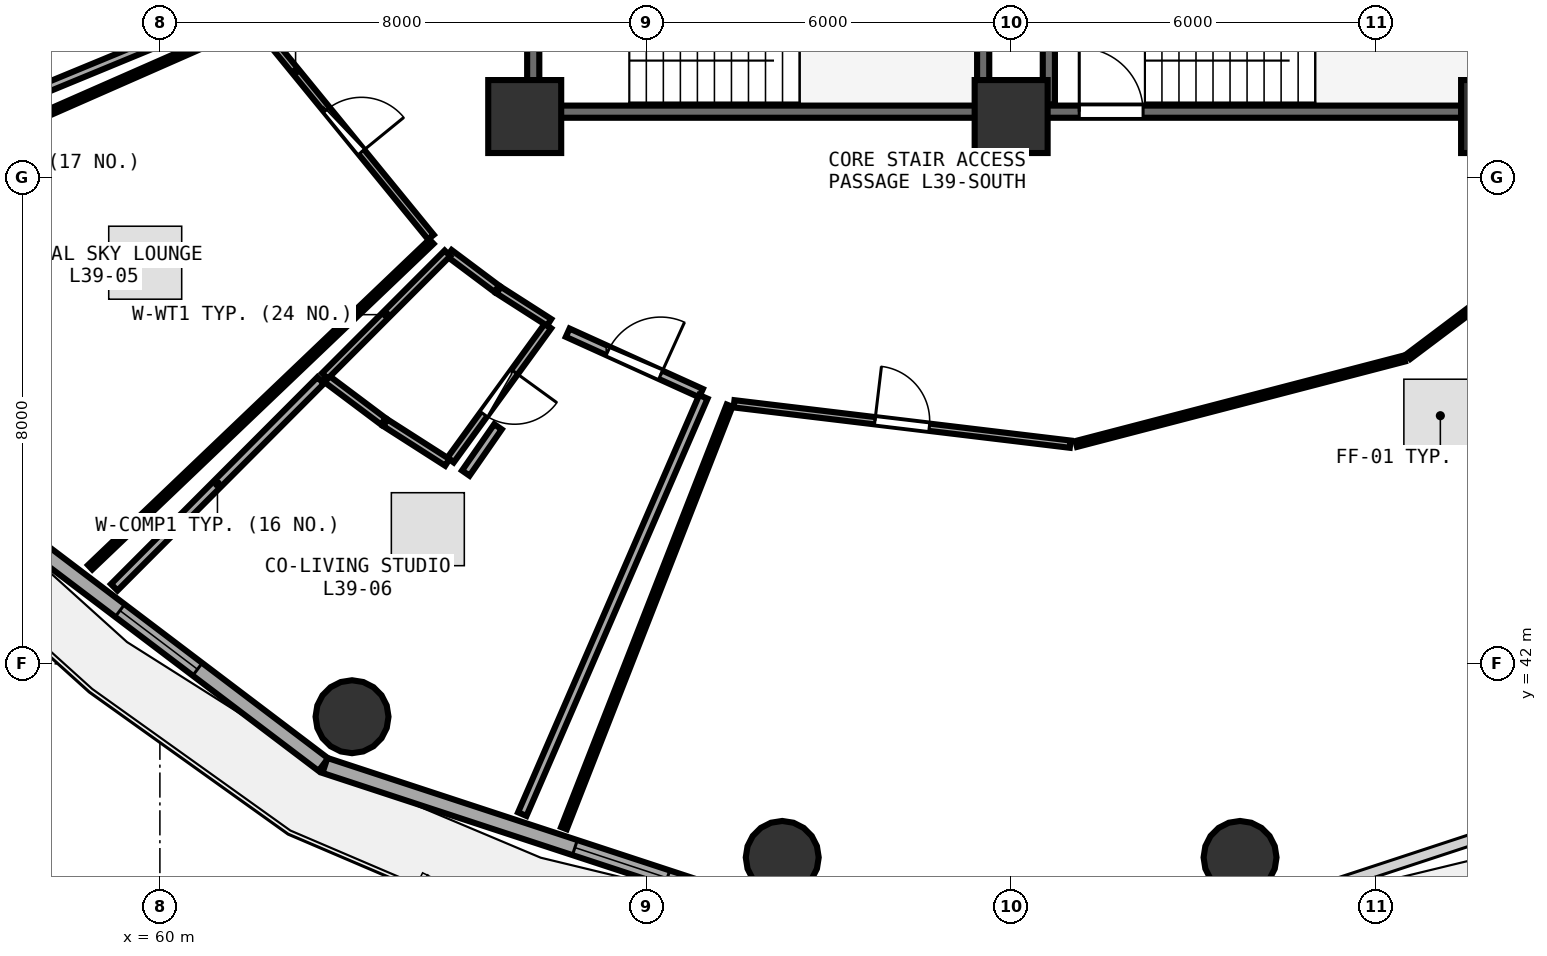
"""IFC4 building model, lengths in metres.
Left out: names, types, materials, properties, quantities, classifications, styles, units other than length and angle.
Written with IfcOpenShell. Run it as: python <this file> out.ifc"""

import sys

from ifc_helpers import new_model, si_unit, direction, frame, frame_2d, origin, origin_2d, place, context, subcontext, project, spatial, rectangle, circle, extrude, element, fill, save


model = new_model("IFC4")
c1 = context("Model", 3, precision=1e-05, world=origin(), true_north=direction((0.0, 1.0)))
c2 = subcontext(c1, "Body", "Model", "MODEL_VIEW")
j1 = project(units=[si_unit("LENGTHUNIT", "METRE"), si_unit("PLANEANGLEUNIT", "RADIAN")], contexts=[c1])
p1 = place(None, origin())
s1 = spatial("IfcSite", under=j1, at=p1, CompositionType="ELEMENT")
p2 = place(p1, origin())
s2 = spatial("IfcBuilding", under=s1, at=p2, CompositionType="ELEMENT")
p3 = place(p2, frame((0.0, 0.0, 154.35)))
s3 = spatial("IfcBuildingStorey", under=s2, at=p3, CompositionType="ELEMENT", Elevation=154.35)
for number, where, z_axis, x_axis in (
    (1, (66.0, 51.0, 0.0), (0.0, 0.0, 1.0), (1.0, 0.0, 0.0)),
    (2, (74.0, 51.0, 0.0), (0.0, 0.0, 1.0), (1.0, 0.0, 0.0)),
    (3, (82.0, 51.0, 0.0), (0.0, 0.0, 1.0), (1.0, 0.0, 0.0)),
):
    element("IfcColumn", number, at=place(p3, frame(where, z_axis=z_axis, x_axis=x_axis)), inside=s3, PredefinedType="PILASTER", context=c2, shape_type="SweptSolid", body=[
        extrude(rectangle(XDim=1.2, YDim=1.2, at=origin_2d()), origin(), (0.0, 0.0, 1.0), 3.75),
    ])
for number, where, z_axis, x_axis in (
    (4, (63.16, 41.13, 0.0), (0.0, 0.0, 1.0), (1.0, 0.0, 0.0)),
    (5, (70.235, 38.816, 0.0), (0.0, 0.0, 1.0), (1.0, 0.0, 0.0)),
    (6, (77.765, 38.816, 0.0), (0.0, 0.0, 1.0), (1.0, 0.0, 0.0)),
):
    element("IfcColumn", number, at=place(p3, frame(where, z_axis=z_axis, x_axis=x_axis)), inside=s3, PredefinedType="COLUMN", context=c2, shape_type="SweptSolid", body=[
        extrude(circle(Radius=0.6, at=origin_2d()), origin(), (0.0, 0.0, 1.0), 3.75),
    ])
p4 = place(p3, frame((56.699, 44.878, 0.0), z_axis=(0.0, 0.0, 1.0), x_axis=(0.797163719609, -0.603763202042, 0.0)))
e7 = element("IfcWall", 7, at=p4, inside=s3, PredefinedType="SOLIDWALL", context=c2, shape_type="SweptSolid", body=[
    extrude(rectangle(XDim=7.512, YDim=0.26, at=frame_2d((3.756, 0.0))), origin(), (0.0, 0.0, 1.0), 3.475),
])
p5 = place(p4, frame((3.316, 0.0, 0.85)))
e8 = element("IfcOpeningElement", 8, at=p5, cuts=e7, PredefinedType="OPENING", context=c2, shape_type="SweptSolid", body=[
    extrude(rectangle(XDim=1.6, YDim=1.45, at=frame_2d((0.8, 0.725))), frame((0.0, 0.14, 0.0), z_axis=(0.0, -1.0, 0.0), x_axis=(1.0, 0.0, 0.0)), (0.0, 0.0, 1.0), 0.28),
])
p6 = place(p3, frame((62.714, 40.328, 0.0), z_axis=(0.0, 0.0, 1.0), x_axis=(0.950038302428, -0.312133343173, 0.0)))
e9 = element("IfcWall", 9, at=p6, inside=s3, PredefinedType="SOLIDWALL", context=c2, shape_type="SweptSolid", body=[
    extrude(rectangle(XDim=7.733, YDim=0.26, at=frame_2d((3.867, 0.0))), origin(), (0.0, 0.0, 1.0), 3.475),
])
p7 = place(p6, frame((4.327, 0.0, 0.85)))
e10 = element("IfcOpeningElement", 10, at=p7, cuts=e9, PredefinedType="OPENING", context=c2, shape_type="SweptSolid", body=[
    extrude(rectangle(XDim=1.6, YDim=1.45, at=frame_2d((0.8, 0.725))), frame((0.0, 0.14, 0.0), z_axis=(0.0, -1.0, 0.0), x_axis=(1.0, 0.0, 0.0)), (0.0, 0.0, 1.0), 0.28),
])
p8 = place(p3, frame((74.0, 51.08, 0.0), z_axis=(0.0, 0.0, 1.0), x_axis=(1.0, 0.0, 0.0)))
e11 = element("IfcWall", 11, at=p8, inside=s3, PredefinedType="SHEAR", context=c2, shape_type="SweptSolid", body=[
    extrude(rectangle(XDim=7.9, YDim=0.2, at=frame_2d((3.95, 0.0))), origin(), (0.0, 0.0, 1.0), 3.49),
])
p9 = place(p8, frame((1.12, 0.0, 0.0)))
e12 = element("IfcOpeningElement", 12, at=p9, cuts=e11, PredefinedType="OPENING", context=c2, shape_type="SweptSolid", body=[
    extrude(rectangle(XDim=1.05, YDim=2.1, at=frame_2d((0.525, 1.05))), frame((0.0, 0.11, 0.0), z_axis=(0.0, -1.0, 0.0), x_axis=(1.0, 0.0, 0.0)), (0.0, 0.0, 1.0), 0.22),
])
p10 = place(p3, frame((74.62, 54.27, 0.0), z_axis=(0.0, 0.0, 1.0), x_axis=(0.0, -1.0, 0.0)))
e13 = element("IfcWall", 13, at=p10, inside=s3, PredefinedType="SHEAR", context=c2, shape_type="SweptSolid", body=[
    extrude(rectangle(XDim=3.07, YDim=0.2, at=frame_2d((1.535, 0.0))), origin(), (0.0, 0.0, 1.0), 3.49),
])
p11 = place(p3, frame((66.26, 51.08, 0.0), z_axis=(0.0, 0.0, 1.0), x_axis=(1.0, 0.0, 0.0)))
e14 = element("IfcWall", 14, at=p11, inside=s3, PredefinedType="SHEAR", context=c2, shape_type="SweptSolid", body=[
    extrude(rectangle(XDim=7.16, YDim=0.2, at=frame_2d((3.58, 0.0))), origin(), (0.0, 0.0, 1.0), 3.49),
])
p12 = place(p3, frame((73.54, 51.2, 0.0), z_axis=(0.0, 0.0, 1.0), x_axis=(0.0, 1.0, 0.0)))
e15 = element("IfcWall", 15, at=p12, inside=s3, PredefinedType="SHEAR", context=c2, shape_type="SweptSolid", body=[
    extrude(rectangle(XDim=3.07, YDim=0.2, at=frame_2d((1.535, 0.0))), origin(), (0.0, 0.0, 1.0), 3.49),
])
p13 = place(p3, frame((66.14, 54.27, 0.0), z_axis=(0.0, 0.0, 1.0), x_axis=(0.0, -1.0, 0.0)))
e16 = element("IfcWall", 16, at=p13, inside=s3, PredefinedType="SHEAR", context=c2, shape_type="SweptSolid", body=[
    extrude(rectangle(XDim=3.07, YDim=0.2, at=frame_2d((1.535, 0.0))), origin(), (0.0, 0.0, 1.0), 3.49),
])
p14 = place(p13, frame((1.01, 0.0, 0.0)))
e17 = element("IfcOpeningElement", 17, at=p14, cuts=e16, PredefinedType="OPENING", context=c2, shape_type="SweptSolid", body=[
    extrude(rectangle(XDim=1.05, YDim=2.1, at=frame_2d((0.525, 1.05))), frame((0.0, 0.11, 0.0), z_axis=(0.0, -1.0, 0.0), x_axis=(1.0, 0.0, 0.0)), (0.0, 0.0, 1.0), 0.22),
])
p15 = place(p3, frame((69.443, 46.276, 0.0), z_axis=(0.0, 0.0, 1.0), x_axis=(0.992874348748, -0.119165966612, 0.0)))
e18 = element("IfcWall", 18, at=p15, inside=s3, PredefinedType="PARTITIONING", context=c2, shape_type="SweptSolid", body=[
    extrude(rectangle(XDim=5.569, YDim=0.12, at=frame_2d((2.784, 0.0))), origin(), (0.0, 0.0, 1.0), 2.975),
])
p16 = place(p15, frame((2.334, 0.0, 0.0)))
e19 = element("IfcOpeningElement", 19, at=p16, cuts=e18, PredefinedType="OPENING", context=c2, shape_type="SweptSolid", body=[
    extrude(rectangle(XDim=0.9, YDim=2.08, at=frame_2d((0.45, 1.04))), frame((0.0, 0.07, 0.0), z_axis=(0.0, -1.0, 0.0), x_axis=(1.0, 0.0, 0.0)), (0.0, 0.0, 1.0), 0.14),
])
p17 = place(p3, frame((61.604, 52.511, 0.0), z_axis=(0.0, 0.0, 1.0), x_axis=(0.632491819148, -0.77456703952, 0.0)))
e20 = element("IfcWall", 20, at=p17, inside=s3, PredefinedType="PARTITIONING", context=c2, shape_type="SweptSolid", body=[
    extrude(rectangle(XDim=4.511, YDim=0.12, at=frame_2d((2.255, 0.0))), origin(), (0.0, 0.0, 1.0), 2.975),
])
p18 = place(p17, frame((1.805, 0.0, 0.0)))
e21 = element("IfcOpeningElement", 21, at=p18, cuts=e20, PredefinedType="OPENING", context=c2, shape_type="SweptSolid", body=[
    extrude(rectangle(XDim=0.9, YDim=2.08, at=frame_2d((0.45, 1.04))), frame((0.0, 0.07, 0.0), z_axis=(0.0, -1.0, 0.0), x_axis=(1.0, 0.0, 0.0)), (0.0, 0.0, 1.0), 0.14),
])
p19 = place(p3, frame((66.383, 47.555, 0.0), z_axis=(0.0, 0.0, 1.0), x_axis=(-0.588001344837, -0.808859949849, 0.0)))
e22 = element("IfcWall", 22, at=p19, inside=s3, PredefinedType="PLUMBINGWALL", context=c2, shape_type="SweptSolid", body=[
    extrude(rectangle(XDim=2.727, YDim=0.13, at=frame_2d((1.364, 0.0))), origin(), (0.0, 0.0, 1.0), 3.235),
])
p20 = place(p19, frame((0.934, 0.0, 0.0)))
e23 = element("IfcOpeningElement", 23, at=p20, cuts=e22, PredefinedType="OPENING", context=c2, shape_type="SweptSolid", body=[
    extrude(rectangle(XDim=0.86, YDim=2.05, at=frame_2d((0.43, 1.025))), frame((0.0, 0.075, 0.0), z_axis=(0.0, -1.0, 0.0), x_axis=(1.0, 0.0, 0.0)), (0.0, 0.0, 1.0), 0.15),
])
p21 = place(p3, frame((66.707, 47.445, 0.0), z_axis=(0.0, 0.0, 1.0), x_axis=(0.910872904928, -0.412686989216, 0.0)))
e24 = element("IfcWall", 24, at=p21, inside=s3, PredefinedType="PARTITIONING", context=c2, shape_type="SweptSolid", body=[
    extrude(rectangle(XDim=2.407, YDim=0.15, at=frame_2d((1.204, 0.0))), origin(), (0.0, 0.0, 1.0), 3.235),
])
p22 = place(p21, frame((0.729, 0.0, 0.0)))
e25 = element("IfcOpeningElement", 25, at=p22, cuts=e24, PredefinedType="OPENING", context=c2, shape_type="SweptSolid", body=[
    extrude(rectangle(XDim=0.95, YDim=2.08, at=frame_2d((0.475, 1.04))), frame((0.0, 0.085, 0.0), z_axis=(0.0, -1.0, 0.0), x_axis=(1.0, 0.0, 0.0)), (0.0, 0.0, 1.0), 0.17),
])
p23 = place(p3, frame((75.07, 45.615, 0.0), z_axis=(0.0, 0.0, 1.0), x_axis=(0.967718115259, 0.252035016216, 0.0)))
e26 = element("IfcWall", 26, at=p23, inside=s3, PredefinedType="PARTITIONING", context=c2, shape_type="SweptSolid", body=[
    extrude(rectangle(XDim=5.575, YDim=0.1, at=frame_2d((2.787, 0.0))), origin(), (0.0, 0.0, 1.0), 2.975),
])
p24 = place(p3, frame((80.535, 47.054, 0.0), z_axis=(0.0, 0.0, 1.0), x_axis=(0.799096406603, 0.601202904979, 0.0)))
e27 = element("IfcWall", 27, at=p24, inside=s3, PredefinedType="PARTITIONING", context=c2, shape_type="SweptSolid", body=[
    extrude(rectangle(XDim=5.387, YDim=0.1, at=frame_2d((2.694, 0.0))), origin(), (0.0, 0.0, 1.0), 2.975),
])
p25 = place(p3, frame((66.645, 39.297, 0.0), z_axis=(0.0, 0.0, 1.0), x_axis=(0.364957999702, 0.931023983823, 0.0)))
e28 = element("IfcWall", 28, at=p25, inside=s3, PredefinedType="PARTITIONING", context=c2, shape_type="SweptSolid", body=[
    extrude(rectangle(XDim=7.464, YDim=0.1, at=frame_2d((3.732, 0.0))), origin(), (0.0, 0.0, 1.0), 3.025),
])
p26 = place(p3, frame((61.385, 52.817, 0.0), z_axis=(0.0, 0.0, 1.0), x_axis=(-0.924352507704, -0.381539567412, 0.0)))
e29 = element("IfcWall", 29, at=p26, inside=s3, PredefinedType="PARTITIONING", context=c2, shape_type="SweptSolid", body=[
    extrude(rectangle(XDim=8.037, YDim=0.15, at=frame_2d((4.019, 0.0))), origin(), (0.0, 0.0, 1.0), 2.975),
])
p27 = place(p3, frame((64.466, 48.943, 0.0), z_axis=(0.0, 0.0, 1.0), x_axis=(-0.723511266615, -0.690312572014, 0.0)))
e30 = element("IfcWall", 30, at=p27, inside=s3, PredefinedType="PARTITIONING", context=c2, shape_type="SweptSolid", body=[
    extrude(rectangle(XDim=7.758, YDim=0.1, at=frame_2d((3.879, 0.0))), origin(), (0.0, 0.0, 1.0), 3.025),
])
p28 = place(p3, frame((54.186, 49.312, 0.0), z_axis=(0.0, 0.0, 1.0), x_axis=(0.915373356269, 0.402606034024, 0.0)))
e31 = element("IfcWall", 31, at=p28, inside=s3, PredefinedType="PARTITIONING", context=c2, shape_type="SweptSolid", body=[
    extrude(rectangle(XDim=8.023, YDim=0.1, at=frame_2d((4.011, 0.0))), origin(), (0.0, 0.0, 1.0), 2.975),
])
p29 = place(p3, frame((64.759, 48.753, 0.0), z_axis=(0.0, 0.0, 1.0), x_axis=(0.800390142897, -0.599479456824, 0.0)))
e32 = element("IfcWall", 32, at=p29, inside=s3, PredefinedType="PLUMBINGWALL", context=c2, shape_type="SweptSolid", body=[
    extrude(rectangle(XDim=0.976, YDim=0.13, at=frame_2d((0.488, 0.0))), origin(), (0.0, 0.0, 1.0), 2.975),
])
p30 = place(p3, frame((65.573, 48.145, 0.0), z_axis=(0.0, 0.0, 1.0), x_axis=(0.842104586495, -0.539314254776, 0.0)))
e33 = element("IfcWall", 33, at=p30, inside=s3, PredefinedType="PLUMBINGWALL", context=c2, shape_type="SweptSolid", body=[
    extrude(rectangle(XDim=0.984, YDim=0.13, at=frame_2d((0.492, 0.0))), origin(), (0.0, 0.0, 1.0), 3.48),
])
p31 = place(p3, frame((64.727, 45.312, 0.0), z_axis=(0.0, 0.0, 1.0), x_axis=(-0.842330007588, 0.538962112135, 0.0)))
e34 = element("IfcWall", 34, at=p31, inside=s3, PredefinedType="PLUMBINGWALL", context=c2, shape_type="SweptSolid", body=[
    extrude(rectangle(XDim=1.21, YDim=0.13, at=frame_2d((0.605, 0.0))), origin(), (0.0, 0.0, 1.0), 2.975),
])
p32 = place(p3, frame((63.675, 45.987, 0.0), z_axis=(0.0, 0.0, 1.0), x_axis=(-0.8, 0.6, 0.0)))
e35 = element("IfcWall", 35, at=p32, inside=s3, PredefinedType="PLUMBINGWALL", context=c2, shape_type="SweptSolid", body=[
    extrude(rectangle(XDim=1.2, YDim=0.13, at=frame_2d((0.6, 0.0))), origin(), (0.0, 0.0, 1.0), 3.48),
])
p33 = place(p3, frame((62.713, 46.733, 0.0), z_axis=(0.0, 0.0, 1.0), x_axis=(0.706764315195, 0.707449081396, 0.0)))
e36 = element("IfcWall", 36, at=p33, inside=s3, PredefinedType="PLUMBINGWALL", context=c2, shape_type="SweptSolid", body=[
    extrude(rectangle(XDim=2.852, YDim=0.13, at=frame_2d((1.426, 0.0))), origin(), (0.0, 0.0, 1.0), 3.235),
])
p34 = place(p3, frame((68.938, 46.39, 0.0), z_axis=(0.0, 0.0, 1.0), x_axis=(-0.398074464123, -0.917353105959, 0.0)))
e37 = element("IfcWall", 37, at=p34, inside=s3, PredefinedType="PARTITIONING", context=c2, shape_type="SweptSolid", body=[
    extrude(rectangle(XDim=7.481, YDim=0.15, at=frame_2d((3.741, 0.0))), origin(), (0.0, 0.0, 1.0), 3.025),
])
p35 = place(p3, frame((59.249, 43.258, 0.0), z_axis=(0.0, 0.0, 1.0), x_axis=(0.706293548202, 0.707919079958, 0.0)))
e38 = element("IfcWall", 38, at=p35, inside=s3, PredefinedType="PARTITIONING", context=c2, shape_type="SweptSolid", body=[
    extrude(rectangle(XDim=4.806, YDim=0.15, at=frame_2d((2.403, 0.0))), origin(), (0.0, 0.0, 1.0), 3.025),
])
p36 = place(p3, frame((65.031, 45.136, 0.0), z_axis=(0.0, 0.0, 1.0), x_axis=(0.570563407037, 0.821253553143, 0.0)))
e39 = element("IfcWall", 39, at=p36, inside=s3, PredefinedType="PARTITIONING", context=c2, shape_type="SweptSolid", body=[
    extrude(rectangle(XDim=0.928, YDim=0.15, at=frame_2d((0.464, 0.0))), origin(), (0.0, 0.0, 1.0), 3.48),
])
p37 = place(p5, origin())
e40 = element("IfcWindow", 40, at=p37, inside=s3, PartitioningType="SINGLE_PANEL", PredefinedType="WINDOW", context=c2, shape_type="SweptSolid", body=[
    extrude(rectangle(XDim=1.6, YDim=1.45, at=frame_2d((0.8, 0.725))), frame((0.0, 0.03, 0.0), z_axis=(0.0, -1.0, 0.0), x_axis=(1.0, 0.0, 0.0)), (0.0, 0.0, 1.0), 0.06),
])
fill(e8, e40)
p38 = place(p7, origin())
e41 = element("IfcWindow", 41, at=p38, inside=s3, PartitioningType="SINGLE_PANEL", PredefinedType="WINDOW", context=c2, shape_type="SweptSolid", body=[
    extrude(rectangle(XDim=1.6, YDim=1.45, at=frame_2d((0.8, 0.725))), frame((0.0, 0.03, 0.0), z_axis=(0.0, -1.0, 0.0), x_axis=(1.0, 0.0, 0.0)), (0.0, 0.0, 1.0), 0.06),
])
fill(e10, e41)
p39 = place(p9, origin())
e42 = element("IfcDoor", 42, at=p39, inside=s3, OperationType="SINGLE_SWING_LEFT", PredefinedType="DOOR", context=c2, shape_type="SweptSolid", body=[
    extrude(rectangle(XDim=1.05, YDim=2.1, at=frame_2d((0.525, 1.05))), frame((0.0, 0.025, 0.0), z_axis=(0.0, -1.0, 0.0), x_axis=(1.0, 0.0, 0.0)), (0.0, 0.0, 1.0), 0.05),
])
fill(e12, e42)
p40 = place(p16, origin())
e43 = element("IfcDoor", 43, at=p40, inside=s3, OperationType="SINGLE_SWING_LEFT", PredefinedType="DOOR", context=c2, shape_type="SweptSolid", body=[
    extrude(rectangle(XDim=0.9, YDim=2.08, at=frame_2d((0.45, 1.04))), frame((0.0, 0.025, 0.0), z_axis=(0.0, -1.0, 0.0), x_axis=(1.0, 0.0, 0.0)), (0.0, 0.0, 1.0), 0.05),
])
fill(e19, e43)
p41 = place(p18, origin())
e44 = element("IfcDoor", 44, at=p41, inside=s3, OperationType="SINGLE_SWING_RIGHT", PredefinedType="DOOR", context=c2, shape_type="SweptSolid", body=[
    extrude(rectangle(XDim=0.9, YDim=2.08, at=frame_2d((0.45, 1.04))), frame((0.0, 0.025, 0.0), z_axis=(0.0, -1.0, 0.0), x_axis=(1.0, 0.0, 0.0)), (0.0, 0.0, 1.0), 0.05),
])
fill(e21, e44)
p42 = place(p20, origin())
e45 = element("IfcDoor", 45, at=p42, inside=s3, OperationType="SINGLE_SWING_LEFT", PredefinedType="DOOR", context=c2, shape_type="SweptSolid", body=[
    extrude(rectangle(XDim=0.86, YDim=2.05, at=frame_2d((0.43, 1.025))), frame((0.0, 0.025, 0.0), z_axis=(0.0, -1.0, 0.0), x_axis=(1.0, 0.0, 0.0)), (0.0, 0.0, 1.0), 0.05),
])
fill(e23, e45)
p43 = place(p22, origin())
e46 = element("IfcDoor", 46, at=p43, inside=s3, OperationType="SINGLE_SWING_RIGHT", PredefinedType="DOOR", context=c2, shape_type="SweptSolid", body=[
    extrude(rectangle(XDim=0.95, YDim=2.08, at=frame_2d((0.475, 1.04))), frame((0.0, 0.025, 0.0), z_axis=(0.0, -1.0, 0.0), x_axis=(1.0, 0.0, 0.0)), (0.0, 0.0, 1.0), 0.05),
])
fill(e25, e46)
save(model, sys.argv[1])
